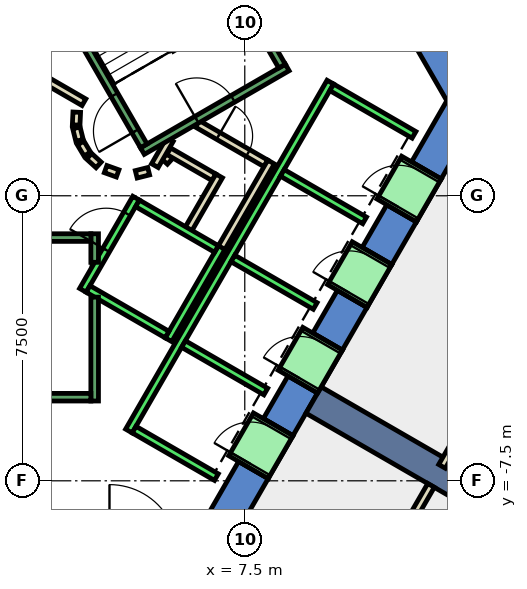
"""IFC4 building model, lengths in metres.
Left out: names, types, materials, properties, quantities, classifications, styles, units other than length and angle.
Written with IfcOpenShell. Run it as: python <this file> out.ifc"""

import sys

from ifc_helpers import new_model, si_unit, direction, frame, frame_2d, origin, place, context, subcontext, project, spatial, polyline, rectangle, outline, extrude, element, fill, save


model = new_model("IFC4")
c1 = context("Model", 3, precision=1e-05, world=origin(), true_north=direction((0.0, 1.0)))
c2 = subcontext(c1, "Body", "Model", "MODEL_VIEW")
j1 = project(units=[si_unit("LENGTHUNIT", "METRE"), si_unit("PLANEANGLEUNIT", "RADIAN")], contexts=[c1])
p1 = place(None, origin())
s1 = spatial("IfcSite", under=j1, at=p1, CompositionType="ELEMENT")
p2 = place(p1, origin())
s2 = spatial("IfcBuilding", under=s1, at=p2, CompositionType="ELEMENT")
p3 = place(p2, frame((0.0, 0.0, 99.2)))
s3 = spatial("IfcBuildingStorey", under=s2, at=p3, CompositionType="ELEMENT", Elevation=99.2)
p4 = place(p3, frame((0.0, 0.0, -0.4)))
e1 = element("IfcWall", 1, at=p4, inside=s3, PredefinedType="SHEAR", context=c2, shape_type="SweptSolid", body=[
    extrude(outline(polyline([(8.517, 11.748), (7.738, 11.298), (12.817, 2.5), (13.856, 2.5), (8.517, 11.748)])), origin(), (0.0, 0.0, 1.0), 4.2),
])
p5 = place(p3, frame((0.0, 0.0, -0.4)))
e2 = element("IfcWall", 2, at=p5, inside=s3, PredefinedType="SHEAR", context=c2, shape_type="SweptSolid", body=[
    extrude(outline(polyline([(8.117, -7.44), (7.338, -6.99), (6.409, -8.6), (6.928, -9.5), (8.117, -7.44)])), origin(), (0.0, 0.0, 1.0), 4.2),
])
p6 = place(p3, frame((0.0, 0.0, -0.4)))
e3 = element("IfcWall", 3, at=p6, inside=s3, PredefinedType="SHEAR", context=c2, shape_type="SweptSolid", body=[
    extrude(outline(polyline([(9.417, -5.189), (8.638, -4.739), (7.988, -5.864), (8.767, -6.314), (9.417, -5.189)])), origin(), (0.0, 0.0, 1.0), 4.2),
])
p7 = place(p3, frame((0.0, 0.0, -0.4)))
e4 = element("IfcWall", 4, at=p7, inside=s3, PredefinedType="SHEAR", context=c2, shape_type="SweptSolid", body=[
    extrude(outline(polyline([(10.717, -2.937), (9.938, -2.487), (9.288, -3.613), (10.067, -4.063), (10.717, -2.937)])), origin(), (0.0, 0.0, 1.0), 4.2),
])
p8 = place(p3, frame((0.0, 0.0, -0.4)))
e5 = element("IfcWall", 5, at=p8, inside=s3, PredefinedType="SHEAR", context=c2, shape_type="SweptSolid", body=[
    extrude(outline(polyline([(12.017, -0.686), (11.238, -0.236), (10.588, -1.361), (11.367, -1.811), (12.017, -0.686)])), origin(), (0.0, 0.0, 1.0), 4.2),
])
p9 = place(p3, frame((0.0, 0.0, -0.4)))
e6 = element("IfcWall", 6, at=p9, inside=s3, PredefinedType="SHEAR", context=c2, shape_type="SweptSolid", body=[
    extrude(outline(polyline([(11.888, 0.89), (12.667, 0.44), (13.856, 2.5), (12.817, 2.5), (11.888, 0.89)])), origin(), (0.0, 0.0, 1.0), 4.2),
])
p10 = place(p3, frame((0.0, 0.0, 3.6)))
e7 = element("IfcWall", 7, at=p10, inside=s3, PredefinedType="SHEAR", context=c2, shape_type="SweptSolid", body=[
    extrude(outline(polyline([(8.767, -6.314), (7.988, -5.864), (7.338, -6.99), (8.117, -7.44), (8.767, -6.314)])), origin(), (0.0, 0.0, 1.0), 0.2),
])
p11 = place(p3, frame((0.0, 0.0, 3.6)))
e8 = element("IfcWall", 8, at=p11, inside=s3, PredefinedType="SHEAR", context=c2, shape_type="SweptSolid", body=[
    extrude(outline(polyline([(10.067, -4.063), (9.288, -3.613), (8.638, -4.739), (9.417, -5.189), (10.067, -4.063)])), origin(), (0.0, 0.0, 1.0), 0.2),
])
p12 = place(p3, frame((0.0, 0.0, 3.6)))
e9 = element("IfcWall", 9, at=p12, inside=s3, PredefinedType="SHEAR", context=c2, shape_type="SweptSolid", body=[
    extrude(outline(polyline([(11.367, -1.811), (10.588, -1.361), (9.938, -2.487), (10.717, -2.937), (11.367, -1.811)])), origin(), (0.0, 0.0, 1.0), 0.2),
])
p13 = place(p3, frame((0.0, 0.0, 3.6)))
e10 = element("IfcWall", 10, at=p13, inside=s3, PredefinedType="SHEAR", context=c2, shape_type="SweptSolid", body=[
    extrude(outline(polyline([(12.667, 0.44), (11.888, 0.89), (11.238, -0.236), (12.017, -0.686), (12.667, 0.44)])), origin(), (0.0, 0.0, 1.0), 0.2),
])
p14 = place(p3, frame((9.31, -5.375, -0.4), z_axis=(0.0, 0.0, 1.0), x_axis=(0.866017533419, -0.500013631625, 0.0)))
e11 = element("IfcWall", 11, at=p14, inside=s3, PredefinedType="SHEAR", context=c2, shape_type="SweptSolid", body=[
    extrude(rectangle(XDim=9.0, YDim=0.8, at=frame_2d((4.5, 0.0))), origin(), (0.0, 0.0, 1.0), 4.2),
])
p15 = place(p3, frame((5.39, 0.898, 0.0), z_axis=(0.0, 0.0, 1.0), x_axis=(0.673828488714, 0.738887791073, 0.0)))
e12 = element("IfcWall", 12, at=p15, inside=s3, PredefinedType="PARTITIONING", context=c2, shape_type="SweptSolid", body=[
    extrude(rectangle(XDim=0.263, YDim=0.2, at=frame_2d((0.131, 0.0))), origin(), (0.0, 0.0, 1.0), 3.8),
])
p16 = place(p3, frame((5.499, 1.172, 0.0), z_axis=(0.0, 0.0, 1.0), x_axis=(0.866333505267, -0.499465972466, 0.0)))
e13 = element("IfcWall", 13, at=p16, inside=s3, PredefinedType="PARTITIONING", context=c2, shape_type="SweptSolid", body=[
    extrude(rectangle(XDim=1.374, YDim=0.2, at=frame_2d((0.687, 0.0))), origin(), (0.0, 0.0, 1.0), 3.8),
])
p17 = place(p3, frame((6.826, 0.522, 0.0), z_axis=(0.0, 0.0, 1.0), x_axis=(-0.500016722714, -0.866015748706, 0.0)))
e14 = element("IfcWall", 14, at=p17, inside=s3, PredefinedType="PARTITIONING", context=c2, shape_type="SweptSolid", body=[
    extrude(rectangle(XDim=1.7, YDim=0.2, at=frame_2d((0.85, 0.0))), origin(), (0.0, 0.0, 1.0), 3.8),
])
p18 = place(p3, frame((6.25, 1.894, 0.0), z_axis=(0.0, 0.0, 1.0), x_axis=(0.866043184279, -0.499969202016, 0.0)))
e15 = element("IfcWall", 15, at=p18, inside=s3, PredefinedType="PARTITIONING", context=c2, shape_type="SweptSolid", body=[
    extrude(rectangle(XDim=2.084, YDim=0.2, at=frame_2d((1.042, 0.0))), origin(), (0.0, 0.0, 1.0), 3.8),
])
p19 = place(p18, frame((0.642, 0.0, 0.0)))
e16 = element("IfcOpeningElement", 16, at=p19, cuts=e15, PredefinedType="OPENING", context=c2, shape_type="SweptSolid", body=[
    extrude(rectangle(XDim=0.9, YDim=2.1, at=frame_2d((0.45, 1.05))), frame((0.0, 0.11, 0.0), z_axis=(0.0, -1.0, 0.0), x_axis=(1.0, 0.0, 0.0)), (0.0, 0.0, 1.0), 0.22),
])
p20 = place(p3, frame((8.192, 0.888, 0.0), z_axis=(0.0, 0.0, 1.0), x_axis=(-0.499940625693, -0.866059680843, 0.0)))
e17 = element("IfcWall", 17, at=p20, inside=s3, PredefinedType="PARTITIONING", context=c2, shape_type="SweptSolid", body=[
    extrude(rectangle(XDim=2.68, YDim=0.2, at=frame_2d((1.34, 0.0))), origin(), (0.0, 0.0, 1.0), 3.8),
])
p21 = place(p3, frame((5.135, 0.793, 0.0), z_axis=(0.0, 0.0, 1.0), x_axis=(0.499526442893, 0.866298639529, 0.0)))
e18 = element("IfcWall", 18, at=p21, inside=s3, PredefinedType="PARTITIONING", context=c2, shape_type="SweptSolid", body=[
    extrude(rectangle(XDim=0.791, YDim=0.2, at=frame_2d((0.396, 0.0))), origin(), (0.0, 0.0, 1.0), 3.8),
])
p22 = place(p3, frame((2.012, 3.186, 0.0), z_axis=(0.0, 0.0, 1.0), x_axis=(0.865891012941, -0.500232699559, 0.0)))
e19 = element("IfcWall", 19, at=p22, inside=s3, PredefinedType="PARTITIONING", context=c2, shape_type="SweptSolid", body=[
    extrude(rectangle(XDim=1.449, YDim=0.2, at=frame_2d((0.725, 0.0))), origin(), (0.0, 0.0, 1.0), 3.8),
])
p23 = place(p3, frame((3.079, 2.199, 0.0), z_axis=(0.0, 0.0, 1.0), x_axis=(-0.047771483479, -0.998858290933, 0.0)))
e20 = element("IfcWall", 20, at=p23, inside=s3, PredefinedType="PARTITIONING", context=c2, shape_type="SweptSolid", body=[
    extrude(rectangle(XDim=0.337, YDim=0.2, at=frame_2d((0.169, 0.0))), origin(), (0.0, 0.0, 1.0), 3.8),
])
p24 = place(p3, frame((3.07, 1.786, 0.0), z_axis=(0.0, 0.0, 1.0), x_axis=(0.242705583207, -0.970099994784, 0.0)))
e21 = element("IfcWall", 21, at=p24, inside=s3, PredefinedType="PARTITIONING", context=c2, shape_type="SweptSolid", body=[
    extrude(rectangle(XDim=0.338, YDim=0.2, at=frame_2d((0.169, 0.0))), origin(), (0.0, 0.0, 1.0), 3.8),
])
for number, where, z_axis, x_axis in (
    (22, (3.182, 1.388, 0.0), (0.0, 0.0, 1.0), (0.512, -0.859, 0.0)),
    (23, (3.404, 1.039, 0.0), (0.0, 0.0, 1.0), (0.74, -0.672, 0.0)),
):
    element("IfcWall", number, at=place(p3, frame(where, z_axis=z_axis, x_axis=x_axis)), inside=s3, PredefinedType="PARTITIONING", context=c2, shape_type="SweptSolid", body=[
        extrude(rectangle(XDim=0.338, YDim=0.2, at=frame_2d((0.169, 0.0))), origin(), (0.0, 0.0, 1.0), 3.8),
    ])
p25 = place(p3, frame((3.838, 0.702, 0.0), z_axis=(0.0, 0.0, 1.0), x_axis=(0.941035081519, -0.338308993895, 0.0)))
e24 = element("IfcWall", 24, at=p25, inside=s3, PredefinedType="PARTITIONING", context=c2, shape_type="SweptSolid", body=[
    extrude(rectangle(XDim=0.337, YDim=0.2, at=frame_2d((0.168, 0.0))), origin(), (0.0, 0.0, 1.0), 3.8),
])
p26 = place(p3, frame((4.644, 0.564, 0.0), z_axis=(0.0, 0.0, 1.0), x_axis=(0.969929076366, 0.243387729394, 0.0)))
e25 = element("IfcWall", 25, at=p26, inside=s3, PredefinedType="PARTITIONING", context=c2, shape_type="SweptSolid", body=[
    extrude(rectangle(XDim=0.337, YDim=0.2, at=frame_2d((0.168, 0.0))), origin(), (0.0, 0.0, 1.0), 3.8),
])
p27 = place(p3, frame((12.401, -7.621, 0.0), z_axis=(0.0, 0.0, 1.0), x_axis=(-0.499983724212, -0.866034800411, 0.0)))
e26 = element("IfcWall", 26, at=p27, inside=s3, PredefinedType="PARTITIONING", context=c2, shape_type="SweptSolid", body=[
    extrude(rectangle(XDim=9.302, YDim=0.2, at=frame_2d((4.651, 0.0))), origin(), (0.0, 0.0, 1.0), 3.8),
])
p28 = place(p3, frame((18.503, 2.949, 0.0), z_axis=(0.0, 0.0, 1.0), x_axis=(-0.49997390151, -0.86604047123, 0.0)))
e27 = element("IfcWall", 27, at=p28, inside=s3, PredefinedType="PARTITIONING", context=c2, shape_type="SweptSolid", body=[
    extrude(rectangle(XDim=11.626, YDim=0.2, at=frame_2d((5.813, 0.0))), origin(), (0.0, 0.0, 1.0), 3.8),
])
p29 = place(p3, frame((3.24, -2.488, 0.0), z_axis=(0.0, 0.0, 1.0), x_axis=(0.49994636267, 0.866056369097, 0.0)))
e28 = element("IfcWall", 28, at=p29, inside=s3, PredefinedType="STANDARD", context=c2, shape_type="SweptSolid", body=[
    extrude(rectangle(XDim=2.8, YDim=0.2, at=frame_2d((1.4, 0.0))), origin(), (0.0, 0.0, 1.0), 3.8),
])
p30 = place(p29, frame((1.225, 0.0, 0.0)))
e29 = element("IfcOpeningElement", 29, at=p30, cuts=e28, PredefinedType="OPENING", context=c2, shape_type="SweptSolid", body=[
    extrude(rectangle(XDim=1.1, YDim=2.1, at=frame_2d((0.55, 1.05))), frame((0.0, 0.11, 0.0), z_axis=(0.0, -1.0, 0.0), x_axis=(1.0, 0.0, 0.0)), (0.0, 0.0, 1.0), 0.22),
])
p31 = place(p3, frame((5.492, -3.788, 0.0), z_axis=(0.0, 0.0, 1.0), x_axis=(0.500011755427, 0.866018616679, 0.0)))
e30 = element("IfcWall", 30, at=p31, inside=s3, PredefinedType="STANDARD", context=c2, shape_type="SweptSolid", body=[
    extrude(rectangle(XDim=2.8, YDim=0.2, at=frame_2d((1.4, 0.0))), origin(), (0.0, 0.0, 1.0), 3.8),
])
p32 = place(p3, frame((3.377, -2.452, 0.0), z_axis=(0.0, 0.0, 1.0), x_axis=(0.865955154139, -0.50012165622, 0.0)))
e31 = element("IfcWall", 31, at=p32, inside=s3, PredefinedType="STANDARD", context=c2, shape_type="SweptSolid", body=[
    extrude(rectangle(XDim=2.4, YDim=0.2, at=frame_2d((1.2, 0.0))), origin(), (0.0, 0.0, 1.0), 3.8),
])
p33 = place(p3, frame((4.677, -0.2, 0.0), z_axis=(0.0, 0.0, 1.0), x_axis=(0.865973769406, -0.500089422704, 0.0)))
e32 = element("IfcWall", 32, at=p33, inside=s3, PredefinedType="STANDARD", context=c2, shape_type="SweptSolid", body=[
    extrude(rectangle(XDim=2.399, YDim=0.2, at=frame_2d((1.2, 0.0))), origin(), (0.0, 0.0, 1.0), 3.8),
])
p34 = place(p3, frame((4.451, -6.19, 0.0), z_axis=(0.0, 0.0, 1.0), x_axis=(0.50000090737, 0.866024879913, 0.0)))
e33 = element("IfcWall", 33, at=p34, inside=s3, PredefinedType="STANDARD", context=c2, shape_type="SweptSolid", body=[
    extrude(rectangle(XDim=10.6, YDim=0.2, at=frame_2d((5.3, 0.0))), origin(), (0.0, 0.0, 1.0), 3.8),
])
for number, where, z_axis, x_axis in (
    (34, (4.588, -6.153, 0.0), (0.0, 0.0, 1.0), (0.866, -0.5, 0.0)),
    (35, (5.888, -3.902, 0.0), (0.0, 0.0, 1.0), (0.866, -0.5, 0.0)),
    (36, (7.188, -1.65, 0.0), (0.0, 0.0, 1.0), (0.866, -0.5, 0.0)),
    (37, (8.488, 0.602, 0.0), (0.0, 0.0, 1.0), (0.866, -0.5, 0.0)),
):
    element("IfcWall", number, at=place(p3, frame(where, z_axis=z_axis, x_axis=x_axis)), inside=s3, PredefinedType="STANDARD", context=c2, shape_type="SweptSolid", body=[
        extrude(rectangle(XDim=2.5, YDim=0.2, at=frame_2d((1.25, 0.0))), origin(), (0.0, 0.0, 1.0), 3.8),
    ])
p35 = place(p3, frame((9.788, 2.853, 0.0), z_axis=(0.0, 0.0, 1.0), x_axis=(0.865998541277, -0.500046524342, 0.0)))
e38 = element("IfcWall", 38, at=p35, inside=s3, PredefinedType="STANDARD", context=c2, shape_type="SweptSolid", body=[
    extrude(rectangle(XDim=2.5, YDim=0.2, at=frame_2d((1.25, 0.0))), origin(), (0.0, 0.0, 1.0), 3.8),
])
p36 = place(p3, frame((7.598, -7.14, 0.0), z_axis=(0.0, 0.0, 1.0), x_axis=(0.500362116554, 0.865816234728, 0.0)))
e39 = element("IfcWall", 39, at=p36, inside=s3, PredefinedType="STANDARD", context=c2, shape_type="SweptSolid", body=[
    extrude(rectangle(XDim=1.299, YDim=1.2, at=frame_2d((0.65, 0.0))), origin(), (0.0, 0.0, 1.0), 2.4),
])
p37 = place(p36, frame((0.1, 0.0, 0.0)))
e40 = element("IfcOpeningElement", 40, at=p37, cuts=e39, PredefinedType="OPENING", context=c2, shape_type="SweptSolid", body=[
    extrude(rectangle(XDim=1.1, YDim=2.3, at=frame_2d((0.55, 1.15))), frame((0.0, 0.61, 0.0), z_axis=(0.0, -1.0, 0.0), x_axis=(1.0, 0.0, 0.0)), (0.0, 0.0, 1.0), 1.22),
])
p38 = place(p3, frame((8.898, -4.889, 0.0), z_axis=(0.0, 0.0, 1.0), x_axis=(0.500036693733, 0.866004217611, 0.0)))
e41 = element("IfcWall", 41, at=p38, inside=s3, PredefinedType="STANDARD", context=c2, shape_type="SweptSolid", body=[
    extrude(rectangle(XDim=1.3, YDim=1.2, at=frame_2d((0.65, 0.0))), origin(), (0.0, 0.0, 1.0), 2.4),
])
p39 = place(p38, frame((0.1, 0.0, 0.0)))
e42 = element("IfcOpeningElement", 42, at=p39, cuts=e41, PredefinedType="OPENING", context=c2, shape_type="SweptSolid", body=[
    extrude(rectangle(XDim=1.1, YDim=2.3, at=frame_2d((0.55, 1.15))), frame((0.0, 0.61, 0.0), z_axis=(0.0, -1.0, 0.0), x_axis=(1.0, 0.0, 0.0)), (0.0, 0.0, 1.0), 1.22),
])
p40 = place(p3, frame((10.198, -2.637, 0.0), z_axis=(0.0, 0.0, 1.0), x_axis=(0.49989585183, 0.866085525409, 0.0)))
e43 = element("IfcWall", 43, at=p40, inside=s3, PredefinedType="STANDARD", context=c2, shape_type="SweptSolid", body=[
    extrude(rectangle(XDim=1.3, YDim=1.2, at=frame_2d((0.65, 0.0))), origin(), (0.0, 0.0, 1.0), 2.4),
])
p41 = place(p40, frame((0.1, 0.0, 0.0)))
e44 = element("IfcOpeningElement", 44, at=p41, cuts=e43, PredefinedType="OPENING", context=c2, shape_type="SweptSolid", body=[
    extrude(rectangle(XDim=1.1, YDim=2.3, at=frame_2d((0.55, 1.15))), frame((0.0, 0.61, 0.0), z_axis=(0.0, -1.0, 0.0), x_axis=(1.0, 0.0, 0.0)), (0.0, 0.0, 1.0), 1.22),
])
p42 = place(p3, frame((11.498, -0.385, 0.0), z_axis=(0.0, 0.0, 1.0), x_axis=(0.500221244143, 0.865897630733, 0.0)))
e45 = element("IfcWall", 45, at=p42, inside=s3, PredefinedType="STANDARD", context=c2, shape_type="SweptSolid", body=[
    extrude(rectangle(XDim=1.299, YDim=1.2, at=frame_2d((0.65, 0.0))), origin(), (0.0, 0.0, 1.0), 2.4),
])
p43 = place(p42, frame((0.1, 0.0, 0.0)))
e46 = element("IfcOpeningElement", 46, at=p43, cuts=e45, PredefinedType="OPENING", context=c2, shape_type="SweptSolid", body=[
    extrude(rectangle(XDim=1.1, YDim=2.3, at=frame_2d((0.55, 1.15))), frame((0.0, 0.61, 0.0), z_axis=(0.0, -1.0, 0.0), x_axis=(1.0, 0.0, 0.0)), (0.0, 0.0, 1.0), 1.22),
])
p44 = place(p3, frame((3.55, -2.667, 0.0), z_axis=(0.0, 0.0, 1.0), x_axis=(0.0, -1.0, 0.0)))
e47 = element("IfcWall", 47, at=p44, inside=s3, PredefinedType="STANDARD", context=c2, shape_type="SweptSolid", body=[
    extrude(rectangle(XDim=2.733, YDim=0.2, at=frame_2d((1.366, 0.0))), origin(), (0.0, 0.0, 1.0), 3.8),
])
p45 = place(p3, frame((3.55, -1.0, 0.0), z_axis=(0.0, 0.0, 1.0), x_axis=(0.0, -1.0, 0.0)))
e48 = element("IfcWall", 48, at=p45, inside=s3, PredefinedType="STANDARD", context=c2, shape_type="SweptSolid", body=[
    extrude(rectangle(XDim=0.751, YDim=0.2, at=frame_2d((0.375, 0.0))), origin(), (0.0, 0.0, 1.0), 3.8),
])
p46 = place(p3, frame((-3.45, -1.1, 0.0), z_axis=(0.0, 0.0, 1.0), x_axis=(1.0, 0.0, 0.0)))
e49 = element("IfcWall", 49, at=p46, inside=s3, PredefinedType="STANDARD", context=c2, shape_type="SweptSolid", body=[
    extrude(rectangle(XDim=6.9, YDim=0.2, at=frame_2d((3.45, 0.0))), origin(), (0.0, 0.0, 1.0), 3.8),
])
p47 = place(p46, frame((0.45, 0.0, 0.0)))
e50 = element("IfcOpeningElement", 50, at=p47, cuts=e49, PredefinedType="OPENING", context=c2, shape_type="SweptSolid", body=[
    extrude(rectangle(XDim=1.1, YDim=2.2, at=frame_2d((0.55, 1.1))), frame((0.0, 0.11, 0.0), z_axis=(0.0, -1.0, 0.0), x_axis=(1.0, 0.0, 0.0)), (0.0, 0.0, 1.0), 0.22),
])
p48 = place(p3, frame((-3.45, -5.3, 0.0), z_axis=(0.0, 0.0, 1.0), x_axis=(1.0, 0.0, 0.0)))
e51 = element("IfcWall", 51, at=p48, inside=s3, PredefinedType="STANDARD", context=c2, shape_type="SweptSolid", body=[
    extrude(rectangle(XDim=6.9, YDim=0.2, at=frame_2d((3.45, 0.0))), origin(), (0.0, 0.0, 1.0), 3.8),
])
p49 = place(p3, frame((4.806, 1.176, 0.0), z_axis=(0.0, 0.0, 1.0), x_axis=(0.866059941101, 0.499940174841, 0.0)))
e52 = element("IfcWall", 52, at=p49, inside=s3, PredefinedType="STANDARD", context=c2, shape_type="SweptSolid", body=[
    extrude(rectangle(XDim=4.4, YDim=0.2, at=frame_2d((2.2, 0.0))), origin(), (0.0, 0.0, 1.0), 3.8),
])
p50 = place(p49, frame((1.65, 0.0, 0.0)))
e53 = element("IfcOpeningElement", 53, at=p50, cuts=e52, PredefinedType="OPENING", context=c2, shape_type="SweptSolid", body=[
    extrude(rectangle(XDim=1.1, YDim=2.2, at=frame_2d((0.55, 1.1))), frame((0.0, 0.11, 0.0), z_axis=(0.0, -1.0, 0.0), x_axis=(1.0, 0.0, 0.0)), (0.0, 0.0, 1.0), 0.22),
])
p51 = place(p3, frame((4.843, 1.312, 0.0), z_axis=(0.0, 0.0, 1.0), x_axis=(-0.499963383562, 0.866046543262, 0.0)))
e54 = element("IfcWall", 54, at=p51, inside=s3, PredefinedType="STANDARD", context=c2, shape_type="SweptSolid", body=[
    extrude(rectangle(XDim=6.9, YDim=0.2, at=frame_2d((3.45, 0.0))), origin(), (0.0, 0.0, 1.0), 3.8),
])
p52 = place(p51, frame((0.45, 0.0, 0.0)))
e55 = element("IfcOpeningElement", 55, at=p52, cuts=e54, PredefinedType="OPENING", context=c2, shape_type="SweptSolid", body=[
    extrude(rectangle(XDim=1.1, YDim=2.2, at=frame_2d((0.55, 1.1))), frame((0.0, 0.11, 0.0), z_axis=(0.0, -1.0, 0.0), x_axis=(1.0, 0.0, 0.0)), (0.0, 0.0, 1.0), 0.22),
])
p53 = place(p3, frame((8.48, 3.412, 0.0), z_axis=(0.0, 0.0, 1.0), x_axis=(-0.499978703459, 0.866037698999, 0.0)))
e56 = element("IfcWall", 56, at=p53, inside=s3, PredefinedType="STANDARD", context=c2, shape_type="SweptSolid", body=[
    extrude(rectangle(XDim=6.9, YDim=0.2, at=frame_2d((3.45, 0.0))), origin(), (0.0, 0.0, 1.0), 3.8),
])
p54 = place(p19, origin())
e57 = element("IfcDoor", 57, at=p54, inside=s3, OperationType="SINGLE_SWING_LEFT", PredefinedType="DOOR", context=c2, shape_type="SweptSolid", body=[
    extrude(rectangle(XDim=0.9, YDim=2.1, at=frame_2d((0.45, 1.05))), frame((0.0, 0.025, 0.0), z_axis=(0.0, -1.0, 0.0), x_axis=(1.0, 0.0, 0.0)), (0.0, 0.0, 1.0), 0.05),
])
fill(e16, e57)
p55 = place(p37, origin())
e58 = element("IfcDoor", 58, at=p55, inside=s3, OperationType="SLIDING_TO_LEFT", PredefinedType="DOOR", context=c2, shape_type="SweptSolid", body=[
    extrude(rectangle(XDim=1.1, YDim=2.3, at=frame_2d((0.55, 1.15))), frame((0.0, 0.025, 0.0), z_axis=(0.0, -1.0, 0.0), x_axis=(1.0, 0.0, 0.0)), (0.0, 0.0, 1.0), 0.05),
])
fill(e40, e58)
p56 = place(p39, origin())
e59 = element("IfcDoor", 59, at=p56, inside=s3, OperationType="SLIDING_TO_LEFT", PredefinedType="DOOR", context=c2, shape_type="SweptSolid", body=[
    extrude(rectangle(XDim=1.1, YDim=2.3, at=frame_2d((0.55, 1.15))), frame((0.0, 0.025, 0.0), z_axis=(0.0, -1.0, 0.0), x_axis=(1.0, 0.0, 0.0)), (0.0, 0.0, 1.0), 0.05),
])
fill(e42, e59)
p57 = place(p41, origin())
e60 = element("IfcDoor", 60, at=p57, inside=s3, OperationType="SLIDING_TO_LEFT", PredefinedType="DOOR", context=c2, shape_type="SweptSolid", body=[
    extrude(rectangle(XDim=1.1, YDim=2.3, at=frame_2d((0.55, 1.15))), frame((0.0, 0.025, 0.0), z_axis=(0.0, -1.0, 0.0), x_axis=(1.0, 0.0, 0.0)), (0.0, 0.0, 1.0), 0.05),
])
fill(e44, e60)
p58 = place(p43, origin())
e61 = element("IfcDoor", 61, at=p58, inside=s3, OperationType="SLIDING_TO_LEFT", PredefinedType="DOOR", context=c2, shape_type="SweptSolid", body=[
    extrude(rectangle(XDim=1.1, YDim=2.3, at=frame_2d((0.55, 1.15))), frame((0.0, 0.025, 0.0), z_axis=(0.0, -1.0, 0.0), x_axis=(1.0, 0.0, 0.0)), (0.0, 0.0, 1.0), 0.05),
])
fill(e46, e61)
p59 = place(p30, origin())
e62 = element("IfcDoor", 62, at=p59, inside=s3, OperationType="SLIDING_TO_LEFT", PredefinedType="DOOR", context=c2, shape_type="SweptSolid", body=[
    extrude(rectangle(XDim=1.1, YDim=2.1, at=frame_2d((0.55, 1.05))), frame((0.0, 0.025, 0.0), z_axis=(0.0, -1.0, 0.0), x_axis=(1.0, 0.0, 0.0)), (0.0, 0.0, 1.0), 0.05),
])
fill(e29, e62)
p60 = place(p52, origin())
e63 = element("IfcDoor", 63, at=p60, inside=s3, OperationType="SINGLE_SWING_LEFT", PredefinedType="DOOR", context=c2, shape_type="SweptSolid", body=[
    extrude(rectangle(XDim=1.1, YDim=2.2, at=frame_2d((0.55, 1.1))), frame((0.0, 0.025, 0.0), z_axis=(0.0, -1.0, 0.0), x_axis=(1.0, 0.0, 0.0)), (0.0, 0.0, 1.0), 0.05),
])
fill(e55, e63)
p61 = place(p50, origin())
e64 = element("IfcDoor", 64, at=p61, inside=s3, OperationType="SINGLE_SWING_LEFT", PredefinedType="DOOR", context=c2, shape_type="SweptSolid", body=[
    extrude(rectangle(XDim=1.1, YDim=2.2, at=frame_2d((0.55, 1.1))), frame((0.0, 0.025, 0.0), z_axis=(0.0, -1.0, 0.0), x_axis=(1.0, 0.0, 0.0)), (0.0, 0.0, 1.0), 0.05),
])
fill(e53, e64)
save(model, sys.argv[1])
